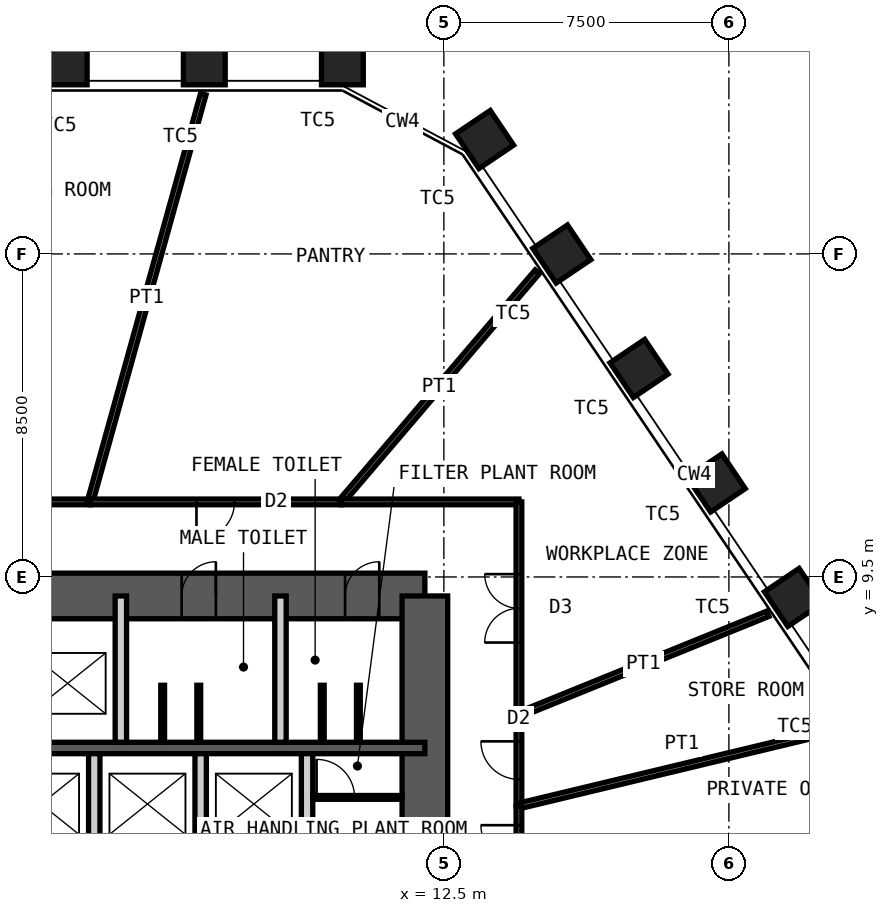
"""IFC4 building model, lengths in metres.
Left out: names, types, materials, properties, quantities, classifications, styles, units other than length and angle.
Written with IfcOpenShell. Run it as: python <this file> out.ifc"""

import sys

from ifc_helpers import new_model, si_unit, direction, frame, frame_2d, origin, origin_2d, place, context, subcontext, project, spatial, rectangle, hollow_rectangle, extrude, element, fill, save


model = new_model("IFC4")
c1 = context("Model", 3, precision=1e-05, world=origin(), true_north=direction((0.0, 1.0)))
c2 = subcontext(c1, "Body", "Model", "MODEL_VIEW")
j1 = project(units=[si_unit("LENGTHUNIT", "METRE"), si_unit("PLANEANGLEUNIT", "RADIAN")], contexts=[c1])
p1 = place(None, origin())
s1 = spatial("IfcSite", under=j1, at=p1, CompositionType="ELEMENT")
p2 = place(p1, origin())
s2 = spatial("IfcBuilding", under=s1, at=p2, CompositionType="ELEMENT")
p3 = place(p2, frame((0.0, 0.0, 205.6)))
s3 = spatial("IfcBuildingStorey", under=s2, at=p3, CompositionType="ELEMENT", Elevation=205.6)
for number, where, z_axis, x_axis in (
    (1, (2.562, 23.0, 0.0), (0.0, 0.0, 1.0), (-1.0, 0.0, 0.0)),
    (2, (6.196, 23.0, 0.0), (0.0, 0.0, 1.0), (-1.0, 0.0, 0.0)),
    (3, (9.829, 23.0, 0.0), (0.0, 0.0, 1.0), (-1.0, 0.0, 0.0)),
    (4, (13.571, 21.01, 0.0), (0.0, 0.0, 1.0), (-0.559, 0.829, 0.0)),
    (5, (15.603, 17.998, 0.0), (0.0, 0.0, 1.0), (-0.559, 0.829, 0.0)),
    (6, (17.635, 14.986, 0.0), (0.0, 0.0, 1.0), (-0.559, 0.829, 0.0)),
    (7, (19.667, 11.973, 0.0), (0.0, 0.0, 1.0), (-0.559, 0.829, 0.0)),
    (8, (21.699, 8.961, 0.0), (0.0, 0.0, 1.0), (-0.559, 0.829, 0.0)),
):
    element("IfcColumn", number, at=place(p3, frame(where, z_axis=z_axis, x_axis=x_axis)), inside=s3, PredefinedType="COLUMN", context=c2, shape_type="SweptSolid", body=[
        extrude(hollow_rectangle(XDim=1.1, YDim=1.1, WallThickness=0.07, at=origin_2d()), origin(), (0.0, 0.0, 1.0), 4.2),
    ])
p4 = place(p3, frame((-12.0, 9.0, 0.0), z_axis=(0.0, 0.0, 1.0), x_axis=(1.0, 0.0, 0.0)))
e9 = element("IfcWall", 9, at=p4, inside=s3, PredefinedType="SHEAR", context=c2, shape_type="SweptSolid", body=[
    extrude(rectangle(XDim=24.0, YDim=1.2, at=frame_2d((12.0, 0.0))), origin(), (0.0, 0.0, 1.0), 4.2),
])
p5 = place(p4, frame((10.4, 0.0, 0.0)))
e10 = element("IfcOpeningElement", 10, at=p5, cuts=e9, PredefinedType="OPENING", context=c2, shape_type="SweptSolid", body=[
    extrude(rectangle(XDim=1.0, YDim=2.1, at=frame_2d((0.5, 1.05))), frame((0.0, 0.61, 0.0), z_axis=(0.0, -1.0, 0.0), x_axis=(1.0, 0.0, 0.0)), (0.0, 0.0, 1.0), 1.22),
])
p6 = place(p4, frame((17.6, 0.0, 0.0)))
e11 = element("IfcOpeningElement", 11, at=p6, cuts=e9, PredefinedType="OPENING", context=c2, shape_type="SweptSolid", body=[
    extrude(rectangle(XDim=0.9, YDim=2.1, at=frame_2d((0.45, 1.05))), frame((0.0, 0.61, 0.0), z_axis=(0.0, -1.0, 0.0), x_axis=(1.0, 0.0, 0.0)), (0.0, 0.0, 1.0), 1.22),
])
p7 = place(p4, frame((21.9, 0.0, 0.0)))
e12 = element("IfcOpeningElement", 12, at=p7, cuts=e9, PredefinedType="OPENING", context=c2, shape_type="SweptSolid", body=[
    extrude(rectangle(XDim=0.9, YDim=2.1, at=frame_2d((0.45, 1.05))), frame((0.0, 0.61, 0.0), z_axis=(0.0, -1.0, 0.0), x_axis=(1.0, 0.0, 0.0)), (0.0, 0.0, 1.0), 1.22),
])
p8 = place(p3, frame((12.0, -9.0, 0.0), z_axis=(0.0, 0.0, 1.0), x_axis=(0.0, 1.0, 0.0)))
e13 = element("IfcWall", 13, at=p8, inside=s3, PredefinedType="SHEAR", context=c2, shape_type="SweptSolid", body=[
    extrude(rectangle(XDim=18.0, YDim=1.2, at=frame_2d((9.0, 0.0))), origin(), (0.0, 0.0, 1.0), 4.2),
])
p9 = place(p8, frame((8.1, 0.0, 0.0)))
e14 = element("IfcOpeningElement", 14, at=p9, cuts=e13, PredefinedType="OPENING", context=c2, shape_type="SweptSolid", body=[
    extrude(rectangle(XDim=1.8, YDim=2.1, at=frame_2d((0.9, 1.05))), frame((0.0, 0.61, 0.0), z_axis=(0.0, -1.0, 0.0), x_axis=(1.0, 0.0, 0.0)), (0.0, 0.0, 1.0), 1.22),
])
p10 = place(p3, frame((-12.0, 5.0, 0.0), z_axis=(0.0, 0.0, 1.0), x_axis=(1.0, 0.0, 0.0)))
e15 = element("IfcWall", 15, at=p10, inside=s3, PredefinedType="SHEAR", context=c2, shape_type="SweptSolid", body=[
    extrude(rectangle(XDim=24.0, YDim=0.3, at=frame_2d((12.0, 0.0))), origin(), (0.0, 0.0, 1.0), 4.2),
])
for number, where, z_axis, x_axis in (
    (16, (4.0, 5.15, 0.0), (0.0, 0.0, 1.0), (0.0, 1.0, 0.0)),
    (17, (8.2, 5.15, 0.0), (0.0, 0.0, 1.0), (0.0, 1.0, 0.0)),
):
    element("IfcWall", number, at=place(p3, frame(where, z_axis=z_axis, x_axis=x_axis)), inside=s3, PredefinedType="PARTITIONING", context=c2, shape_type="SweptSolid", body=[
        extrude(rectangle(XDim=3.85, YDim=0.3, at=frame_2d((1.925, 0.0))), origin(), (0.0, 0.0, 1.0), 3.98),
    ])
for number, where, z_axis, x_axis in (
    (18, (3.3, 2.2, 0.0), (0.0, 0.0, 1.0), (0.0, 1.0, 0.0)),
    (19, (6.1, 2.2, 0.0), (0.0, 0.0, 1.0), (0.0, 1.0, 0.0)),
    (20, (8.9, 2.2, 0.0), (0.0, 0.0, 1.0), (0.0, 1.0, 0.0)),
):
    element("IfcWall", number, at=place(p3, frame(where, z_axis=z_axis, x_axis=x_axis)), inside=s3, PredefinedType="PARTITIONING", context=c2, shape_type="SweptSolid", body=[
        extrude(rectangle(XDim=2.65, YDim=0.3, at=frame_2d((1.325, 0.0))), origin(), (0.0, 0.0, 1.0), 3.98),
    ])
p11 = place(p3, frame((9.05, 3.7, 0.0), z_axis=(0.0, 0.0, 1.0), x_axis=(1.0, 0.0, 0.0)))
e21 = element("IfcWall", 21, at=p11, inside=s3, PredefinedType="PARTITIONING", context=c2, shape_type="SweptSolid", body=[
    extrude(rectangle(XDim=2.35, YDim=0.1, at=frame_2d((1.175, 0.0))), origin(), (0.0, 0.0, 1.0), 3.98),
])
p12 = place(p11, frame((0.1, 0.0, 0.0)))
e22 = element("IfcOpeningElement", 22, at=p12, cuts=e21, PredefinedType="OPENING", context=c2, shape_type="SweptSolid", body=[
    extrude(rectangle(XDim=1.0, YDim=2.4, at=frame_2d((0.5, 1.2))), frame((0.0, 0.06, 0.0), z_axis=(0.0, -1.0, 0.0), x_axis=(1.0, 0.0, 0.0)), (0.0, 0.0, 1.0), 0.12),
])
for number, where, z_axis, x_axis in (
    (23, (5.1, 5.15, 0.0), (0.0, 0.0, 1.0), (0.0, 1.0, 0.0)),
    (24, (6.05, 5.15, 0.0), (0.0, 0.0, 1.0), (0.0, 1.0, 0.0)),
    (25, (9.3, 5.15, 0.0), (0.0, 0.0, 1.0), (0.0, 1.0, 0.0)),
    (26, (10.25, 5.15, 0.0), (0.0, 0.0, 1.0), (0.0, 1.0, 0.0)),
):
    element("IfcWall", number, at=place(p3, frame(where, z_axis=z_axis, x_axis=x_axis)), inside=s3, PredefinedType="PARTITIONING", context=c2, shape_type="SweptSolid", body=[
        extrude(rectangle(XDim=1.5, YDim=0.1, at=frame_2d((0.75, 0.0))), origin(), (0.0, 0.0, 1.0), 2.1),
    ])
p13 = place(p3, frame((-0.551, 11.475, 0.0), z_axis=(0.0, 0.0, 1.0), x_axis=(1.0, 0.0, 0.0)))
e27 = element("IfcWall", 27, at=p13, inside=s3, PredefinedType="PARTITIONING", context=c2, shape_type="SweptSolid", body=[
    extrude(rectangle(XDim=3.74, YDim=0.15, at=frame_2d((1.87, 0.0))), origin(), (0.0, 0.0, 1.0), 4.03),
])
p14 = place(p13, frame((1.37, 0.0, 0.0)))
e28 = element("IfcOpeningElement", 28, at=p14, cuts=e27, PredefinedType="OPENING", context=c2, shape_type="SweptSolid", body=[
    extrude(rectangle(XDim=1.0, YDim=2.4, at=frame_2d((0.5, 1.2))), frame((0.0, 0.085, 0.0), z_axis=(0.0, -1.0, 0.0), x_axis=(1.0, 0.0, 0.0)), (0.0, 0.0, 1.0), 0.17),
])
p15 = place(p3, frame((6.169, 22.204, 0.0), z_axis=(0.0, 0.0, 1.0), x_axis=(-0.26769135876, -0.963504715321, 0.0)))
e29 = element("IfcWall", 29, at=p15, inside=s3, PredefinedType="PARTITIONING", context=c2, shape_type="SweptSolid", body=[
    extrude(rectangle(XDim=11.135, YDim=0.15, at=frame_2d((5.567, 0.0))), origin(), (0.0, 0.0, 1.0), 3.43),
])
p16 = place(p3, frame((3.188, 11.475, 0.0), z_axis=(0.0, 0.0, 1.0), x_axis=(1.0, 0.0, 0.0)))
e30 = element("IfcWall", 30, at=p16, inside=s3, PredefinedType="PARTITIONING", context=c2, shape_type="SweptSolid", body=[
    extrude(rectangle(XDim=6.603, YDim=0.15, at=frame_2d((3.301, 0.0))), origin(), (0.0, 0.0, 1.0), 4.03),
])
p17 = place(p16, frame((2.802, 0.0, 0.0)))
e31 = element("IfcOpeningElement", 31, at=p17, cuts=e30, PredefinedType="OPENING", context=c2, shape_type="SweptSolid", body=[
    extrude(rectangle(XDim=1.0, YDim=2.4, at=frame_2d((0.5, 1.2))), frame((0.0, 0.085, 0.0), z_axis=(0.0, -1.0, 0.0), x_axis=(1.0, 0.0, 0.0)), (0.0, 0.0, 1.0), 0.17),
])
p18 = place(p3, frame((14.958, 17.531, 0.0), z_axis=(0.0, 0.0, 1.0), x_axis=(-0.649097500837, -0.760705221756, 0.0)))
e32 = element("IfcWall", 32, at=p18, inside=s3, PredefinedType="PARTITIONING", context=c2, shape_type="SweptSolid", body=[
    extrude(rectangle(XDim=7.96, YDim=0.15, at=frame_2d((3.98, 0.0))), origin(), (0.0, 0.0, 1.0), 3.43),
])
p19 = place(p3, frame((9.791, 11.475, 0.0), z_axis=(0.0, 0.0, 1.0), x_axis=(1.0, 0.0, 0.0)))
e33 = element("IfcWall", 33, at=p19, inside=s3, PredefinedType="PARTITIONING", context=c2, shape_type="SweptSolid", body=[
    extrude(rectangle(XDim=4.684, YDim=0.15, at=frame_2d((2.342, 0.0))), origin(), (0.0, 0.0, 1.0), 4.03),
])
p20 = place(p3, frame((14.475, 11.475, 0.0), z_axis=(0.0, 0.0, 1.0), x_axis=(0.0, -1.0, 0.0)))
e34 = element("IfcWall", 34, at=p20, inside=s3, PredefinedType="PARTITIONING", context=c2, shape_type="SweptSolid", body=[
    extrude(rectangle(XDim=5.601, YDim=0.15, at=frame_2d((2.801, 0.0))), origin(), (0.0, 0.0, 1.0), 4.03),
])
p21 = place(p20, frame((1.901, 0.0, 0.0)))
e35 = element("IfcOpeningElement", 35, at=p21, cuts=e34, PredefinedType="OPENING", context=c2, shape_type="SweptSolid", body=[
    extrude(rectangle(XDim=1.8, YDim=2.4, at=frame_2d((0.9, 1.2))), frame((0.0, 0.085, 0.0), z_axis=(0.0, -1.0, 0.0), x_axis=(1.0, 0.0, 0.0)), (0.0, 0.0, 1.0), 0.17),
])
p22 = place(p3, frame((21.026, 8.532, 0.0), z_axis=(0.0, 0.0, 1.0), x_axis=(-0.926617028548, -0.376006492503, 0.0)))
e36 = element("IfcWall", 36, at=p22, inside=s3, PredefinedType="PARTITIONING", context=c2, shape_type="SweptSolid", body=[
    extrude(rectangle(XDim=7.07, YDim=0.15, at=frame_2d((3.535, 0.0))), origin(), (0.0, 0.0, 1.0), 3.43),
])
p23 = place(p3, frame((14.475, 5.874, 0.0), z_axis=(0.0, 0.0, 1.0), x_axis=(0.0, -1.0, 0.0)))
e37 = element("IfcWall", 37, at=p23, inside=s3, PredefinedType="PARTITIONING", context=c2, shape_type="SweptSolid", body=[
    extrude(rectangle(XDim=2.399, YDim=0.15, at=frame_2d((1.2, 0.0))), origin(), (0.0, 0.0, 1.0), 4.03),
])
p24 = place(p23, frame((0.699, 0.0, 0.0)))
e38 = element("IfcOpeningElement", 38, at=p24, cuts=e37, PredefinedType="OPENING", context=c2, shape_type="SweptSolid", body=[
    extrude(rectangle(XDim=1.0, YDim=2.4, at=frame_2d((0.5, 1.2))), frame((0.0, 0.085, 0.0), z_axis=(0.0, -1.0, 0.0), x_axis=(1.0, 0.0, 0.0)), (0.0, 0.0, 1.0), 0.17),
])
p25 = place(p3, frame((23.053, 5.534, 0.0), z_axis=(0.0, 0.0, 1.0), x_axis=(-0.972377252501, -0.233414821335, 0.0)))
e39 = element("IfcWall", 39, at=p25, inside=s3, PredefinedType="PARTITIONING", context=c2, shape_type="SweptSolid", body=[
    extrude(rectangle(XDim=8.822, YDim=0.15, at=frame_2d((4.411, 0.0))), origin(), (0.0, 0.0, 1.0), 3.43),
])
p26 = place(p3, frame((14.475, 3.475, 0.0), z_axis=(0.0, 0.0, 1.0), x_axis=(0.0, -1.0, 0.0)))
e40 = element("IfcWall", 40, at=p26, inside=s3, PredefinedType="PARTITIONING", context=c2, shape_type="SweptSolid", body=[
    extrude(rectangle(XDim=2.012, YDim=0.15, at=frame_2d((1.006, 0.0))), origin(), (0.0, 0.0, 1.0), 4.03),
])
p27 = place(p26, frame((0.506, 0.0, 0.0)))
e41 = element("IfcOpeningElement", 41, at=p27, cuts=e40, PredefinedType="OPENING", context=c2, shape_type="SweptSolid", body=[
    extrude(rectangle(XDim=1.0, YDim=2.4, at=frame_2d((0.5, 1.2))), frame((0.0, 0.085, 0.0), z_axis=(0.0, -1.0, 0.0), x_axis=(1.0, 0.0, 0.0)), (0.0, 0.0, 1.0), 0.17),
])
p28 = place(p6, origin())
e42 = element("IfcDoor", 42, at=p28, inside=s3, OperationType="SINGLE_SWING_LEFT", PredefinedType="DOOR", context=c2, shape_type="SweptSolid", body=[
    extrude(rectangle(XDim=0.9, YDim=2.1, at=frame_2d((0.45, 1.05))), frame((0.0, 0.025, 0.0), z_axis=(0.0, -1.0, 0.0), x_axis=(1.0, 0.0, 0.0)), (0.0, 0.0, 1.0), 0.05),
])
fill(e11, e42)
p29 = place(p7, origin())
e43 = element("IfcDoor", 43, at=p29, inside=s3, OperationType="SINGLE_SWING_LEFT", PredefinedType="DOOR", context=c2, shape_type="SweptSolid", body=[
    extrude(rectangle(XDim=0.9, YDim=2.1, at=frame_2d((0.45, 1.05))), frame((0.0, 0.025, 0.0), z_axis=(0.0, -1.0, 0.0), x_axis=(1.0, 0.0, 0.0)), (0.0, 0.0, 1.0), 0.05),
])
fill(e12, e43)
p30 = place(p12, origin())
e44 = element("IfcDoor", 44, at=p30, inside=s3, OperationType="SINGLE_SWING_RIGHT", PredefinedType="DOOR", context=c2, shape_type="SweptSolid", body=[
    extrude(rectangle(XDim=1.0, YDim=2.4, at=frame_2d((0.5, 1.2))), frame((0.0, 0.025, 0.0), z_axis=(0.0, -1.0, 0.0), x_axis=(1.0, 0.0, 0.0)), (0.0, 0.0, 1.0), 0.05),
])
fill(e22, e44)
p31 = place(p17, origin())
e45 = element("IfcDoor", 45, at=p31, inside=s3, OperationType="SINGLE_SWING_LEFT", PredefinedType="DOOR", context=c2, shape_type="SweptSolid", body=[
    extrude(rectangle(XDim=1.0, YDim=2.4, at=frame_2d((0.5, 1.2))), frame((0.0, 0.025, 0.0), z_axis=(0.0, -1.0, 0.0), x_axis=(1.0, 0.0, 0.0)), (0.0, 0.0, 1.0), 0.05),
])
fill(e31, e45)
p32 = place(p21, origin())
e46 = element("IfcDoor", 46, at=p32, inside=s3, OperationType="DOUBLE_DOOR_DOUBLE_SWING", PredefinedType="DOOR", context=c2, shape_type="SweptSolid", body=[
    extrude(rectangle(XDim=1.8, YDim=2.4, at=frame_2d((0.9, 1.2))), frame((0.0, 0.025, 0.0), z_axis=(0.0, -1.0, 0.0), x_axis=(1.0, 0.0, 0.0)), (0.0, 0.0, 1.0), 0.05),
])
fill(e35, e46)
p33 = place(p24, origin())
e47 = element("IfcDoor", 47, at=p33, inside=s3, OperationType="SINGLE_SWING_LEFT", PredefinedType="DOOR", context=c2, shape_type="SweptSolid", body=[
    extrude(rectangle(XDim=1.0, YDim=2.4, at=frame_2d((0.5, 1.2))), frame((0.0, 0.025, 0.0), z_axis=(0.0, -1.0, 0.0), x_axis=(1.0, 0.0, 0.0)), (0.0, 0.0, 1.0), 0.05),
])
fill(e38, e47)
p34 = place(p27, origin())
e48 = element("IfcDoor", 48, at=p34, inside=s3, OperationType="SINGLE_SWING_LEFT", PredefinedType="DOOR", context=c2, shape_type="SweptSolid", body=[
    extrude(rectangle(XDim=1.0, YDim=2.4, at=frame_2d((0.5, 1.2))), frame((0.0, 0.025, 0.0), z_axis=(0.0, -1.0, 0.0), x_axis=(1.0, 0.0, 0.0)), (0.0, 0.0, 1.0), 0.05),
])
fill(e41, e48)
save(model, sys.argv[1])
